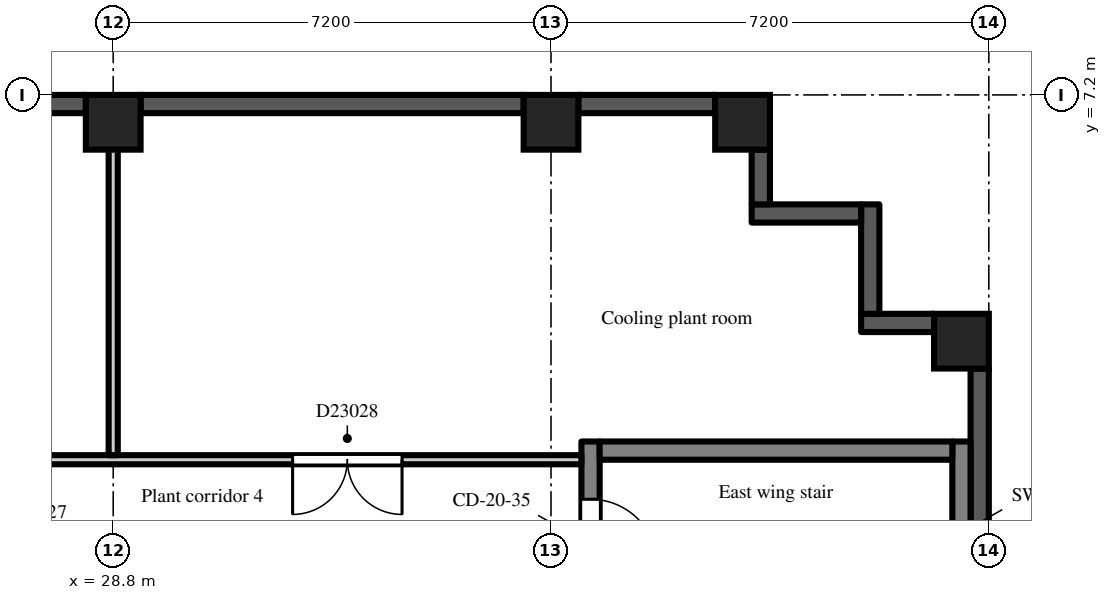
"""IFC4 building model, lengths in metres.
Left out: names, types, materials, properties, quantities, classifications, styles, units other than length and angle.
Written with IfcOpenShell. Run it as: python <this file> out.ifc"""

import sys

from ifc_helpers import new_model, si_unit, direction, frame, frame_2d, origin, origin_2d, place, context, subcontext, project, spatial, polyline, rectangle, outline, extrude, element, fill, save


model = new_model("IFC4")
c1 = context("Model", 3, precision=1e-05, world=origin(), true_north=direction((0.0, 1.0)))
c2 = subcontext(c1, "Body", "Model", "MODEL_VIEW")
j1 = project(units=[si_unit("LENGTHUNIT", "METRE"), si_unit("PLANEANGLEUNIT", "RADIAN")], contexts=[c1])
p1 = place(None, origin())
s1 = spatial("IfcSite", under=j1, at=p1, CompositionType="ELEMENT")
p2 = place(p1, origin())
s2 = spatial("IfcBuilding", under=s1, at=p2, CompositionType="ELEMENT")
p3 = place(p2, frame((0.0, 0.0, 162.3)))
s3 = spatial("IfcBuildingStorey", under=s2, at=p3, CompositionType="ELEMENT", Elevation=162.3)
for number, where, z_axis, x_axis in (
    (1, (28.8, 6.75, 0.0), (0.0, 0.0, 1.0), (1.0, 0.0, 0.0)),
    (2, (36.0, 6.75, 0.0), (0.0, 0.0, 1.0), (1.0, 0.0, 0.0)),
    (3, (39.15, 6.75, 0.0), (0.0, 0.0, 1.0), (1.0, 0.0, 0.0)),
    (4, (42.75, 3.15, 0.0), (0.0, 0.0, 1.0), (1.0, 0.0, 0.0)),
):
    element("IfcColumn", number, at=place(p3, frame(where, z_axis=z_axis, x_axis=x_axis)), inside=s3, PredefinedType="COLUMN", context=c2, shape_type="SweptSolid", body=[
        extrude(rectangle(XDim=0.9, YDim=0.9, at=origin_2d()), origin(), (0.0, 0.0, 1.0), 4.2),
    ])
p4 = place(p3, frame((43.05, -2.7, 0.0), z_axis=(0.0, 0.0, 1.0), x_axis=(0.0, 1.0, 0.0)))
e5 = element("IfcWall", 5, at=p4, inside=s3, PredefinedType="SOLIDWALL", context=c2, shape_type="SweptSolid", body=[
    extrude(rectangle(XDim=5.4, YDim=0.3, at=frame_2d((2.7, 0.0))), origin(), (0.0, 0.0, 1.0), 3.8),
])
p5 = place(p3, frame((42.3, 3.45, 0.0), z_axis=(0.0, 0.0, 1.0), x_axis=(-1.0, 0.0, 0.0)))
e6 = element("IfcWall", 6, at=p5, inside=s3, PredefinedType="SOLIDWALL", context=c2, shape_type="SweptSolid", body=[
    extrude(rectangle(XDim=1.2, YDim=0.3, at=frame_2d((0.6, 0.0))), origin(), (0.0, 0.0, 1.0), 3.8),
])
p6 = place(p3, frame((41.25, 3.6, 0.0), z_axis=(0.0, 0.0, 1.0), x_axis=(0.0, 1.0, 0.0)))
e7 = element("IfcWall", 7, at=p6, inside=s3, PredefinedType="SOLIDWALL", context=c2, shape_type="SweptSolid", body=[
    extrude(rectangle(XDim=1.8, YDim=0.3, at=frame_2d((0.9, 0.0))), origin(), (0.0, 0.0, 1.0), 3.8),
])
p7 = place(p3, frame((41.1, 5.25, 0.0), z_axis=(0.0, 0.0, 1.0), x_axis=(-1.0, 0.0, 0.0)))
e8 = element("IfcWall", 8, at=p7, inside=s3, PredefinedType="SOLIDWALL", context=c2, shape_type="SweptSolid", body=[
    extrude(rectangle(XDim=1.8, YDim=0.3, at=frame_2d((0.9, 0.0))), origin(), (0.0, 0.0, 1.0), 3.8),
])
p8 = place(p3, frame((39.45, 5.4, 0.0), z_axis=(0.0, 0.0, 1.0), x_axis=(0.0, 1.0, 0.0)))
e9 = element("IfcWall", 9, at=p8, inside=s3, PredefinedType="SOLIDWALL", context=c2, shape_type="SweptSolid", body=[
    extrude(rectangle(XDim=0.9, YDim=0.3, at=frame_2d((0.45, 0.0))), origin(), (0.0, 0.0, 1.0), 3.8),
])
p9 = place(p3, frame((38.7, 7.05, 0.0), z_axis=(0.0, 0.0, 1.0), x_axis=(-1.0, 0.0, 0.0)))
e10 = element("IfcWall", 10, at=p9, inside=s3, PredefinedType="SOLIDWALL", context=c2, shape_type="SweptSolid", body=[
    extrude(rectangle(XDim=2.25, YDim=0.3, at=frame_2d((1.125, 0.0))), origin(), (0.0, 0.0, 1.0), 3.8),
])
p10 = place(p3, frame((35.55, 7.05, 0.0), z_axis=(0.0, 0.0, 1.0), x_axis=(-1.0, 0.0, 0.0)))
e11 = element("IfcWall", 11, at=p10, inside=s3, PredefinedType="SOLIDWALL", context=c2, shape_type="SweptSolid", body=[
    extrude(outline(polyline([(0.0, 0.0), (6.3, 0.0), (6.3, 3.8), (5.152, 3.8), (5.15, 3.4), (4.35, 3.4), (4.348, 3.8), (0.0, 3.8), (0.0, 0.0)])), frame((0.0, 0.15, 0.0), z_axis=(0.0, -1.0, 0.0), x_axis=(1.0, 0.0, 0.0)), (0.0, 0.0, 1.0), 0.3),
])
p11 = place(p3, frame((28.35, 7.05, 0.0), z_axis=(0.0, 0.0, 1.0), x_axis=(-1.0, 0.0, 0.0)))
e12 = element("IfcWall", 12, at=p11, inside=s3, PredefinedType="SOLIDWALL", context=c2, shape_type="SweptSolid", body=[
    extrude(rectangle(XDim=3.15, YDim=0.3, at=frame_2d((1.575, 0.0))), origin(), (0.0, 0.0, 1.0), 3.8),
])
p12 = place(p3, frame((36.65, -1.5, 0.0), z_axis=(0.0, 0.0, 1.0), x_axis=(0.0, 1.0, 0.0)))
e13 = element("IfcWall", 13, at=p12, inside=s3, PredefinedType="SHEAR", context=c2, shape_type="SweptSolid", body=[
    extrude(rectangle(XDim=3.0, YDim=0.3, at=frame_2d((1.5, 0.0))), origin(), (0.0, 0.0, 1.0), 3.8),
])
p13 = place(p12, frame((0.95, 0.0, 0.0)))
e14 = element("IfcOpeningElement", 14, at=p13, cuts=e13, PredefinedType="OPENING", context=c2, shape_type="SweptSolid", body=[
    extrude(rectangle(XDim=1.1, YDim=2.1, at=frame_2d((0.55, 1.05))), frame((0.0, 0.16, 0.0), z_axis=(0.0, -1.0, 0.0), x_axis=(1.0, 0.0, 0.0)), (0.0, 0.0, 1.0), 0.32),
])
p14 = place(p3, frame((42.75, -1.5, 0.0), z_axis=(0.0, 0.0, 1.0), x_axis=(0.0, 1.0, 0.0)))
e15 = element("IfcWall", 15, at=p14, inside=s3, PredefinedType="SHEAR", context=c2, shape_type="SweptSolid", body=[
    extrude(rectangle(XDim=3.0, YDim=0.3, at=frame_2d((1.5, 0.0))), origin(), (0.0, 0.0, 1.0), 3.8),
])
p15 = place(p3, frame((36.8, 1.35, 0.0), z_axis=(0.0, 0.0, 1.0), x_axis=(1.0, 0.0, 0.0)))
e16 = element("IfcWall", 16, at=p15, inside=s3, PredefinedType="SHEAR", context=c2, shape_type="SweptSolid", body=[
    extrude(rectangle(XDim=5.8, YDim=0.3, at=frame_2d((2.9, 0.0))), origin(), (0.0, 0.0, 1.0), 3.8),
])
p16 = place(p3, frame((21.6, 1.2, 0.0), z_axis=(0.0, 0.0, 1.0), x_axis=(1.0, 0.0, 0.0)))
e17 = element("IfcWall", 17, at=p16, inside=s3, PredefinedType="PARTITIONING", context=c2, shape_type="SweptSolid", body=[
    extrude(outline(polyline([(0.0, 0.0), (14.9, 0.0), (14.9, 3.8), (9.602, 3.8), (9.6, 3.4), (8.8, 3.4), (8.798, 3.8), (0.0, 3.8), (0.0, 0.0)])), frame((0.0, 0.075, 0.0), z_axis=(0.0, -1.0, 0.0), x_axis=(1.0, 0.0, 0.0)), (0.0, 0.0, 1.0), 0.15),
])
p17 = place(p16, frame((0.65, 0.0, 0.0)))
e18 = element("IfcOpeningElement", 18, at=p17, cuts=e17, PredefinedType="OPENING", context=c2, shape_type="SweptSolid", body=[
    extrude(rectangle(XDim=1.2, YDim=2.1, at=frame_2d((0.6, 1.05))), frame((0.0, 0.085, 0.0), z_axis=(0.0, -1.0, 0.0), x_axis=(1.0, 0.0, 0.0)), (0.0, 0.0, 1.0), 0.17),
])
p18 = place(p16, frame((4.8, 0.0, 0.0)))
e19 = element("IfcOpeningElement", 19, at=p18, cuts=e17, PredefinedType="OPENING", context=c2, shape_type="SweptSolid", body=[
    extrude(rectangle(XDim=1.2, YDim=2.1, at=frame_2d((0.6, 1.05))), frame((0.0, 0.085, 0.0), z_axis=(0.0, -1.0, 0.0), x_axis=(1.0, 0.0, 0.0)), (0.0, 0.0, 1.0), 0.17),
])
p19 = place(p16, frame((10.15, 0.0, 0.0)))
e20 = element("IfcOpeningElement", 20, at=p19, cuts=e17, PredefinedType="OPENING", context=c2, shape_type="SweptSolid", body=[
    extrude(rectangle(XDim=1.8, YDim=2.1, at=frame_2d((0.9, 1.05))), frame((0.0, 0.085, 0.0), z_axis=(0.0, -1.0, 0.0), x_axis=(1.0, 0.0, 0.0)), (0.0, 0.0, 1.0), 0.17),
])
p20 = place(p3, frame((28.8, 1.275, 0.0), z_axis=(0.0, 0.0, 1.0), x_axis=(0.0, 1.0, 0.0)))
e21 = element("IfcWall", 21, at=p20, inside=s3, PredefinedType="PARTITIONING", context=c2, shape_type="SweptSolid", body=[
    extrude(rectangle(XDim=5.625, YDim=0.15, at=frame_2d((2.812, 0.0))), origin(), (0.0, 0.0, 1.0), 2.3),
])
p21 = place(p13, frame((1.1, 0.0, 0.0), z_axis=(0.0, 0.0, 1.0), x_axis=(-1.0, 0.0, 0.0)))
e22 = element("IfcDoor", 22, at=p21, inside=s3, OperationType="SINGLE_SWING_RIGHT", PredefinedType="DOOR", context=c2, shape_type="SweptSolid", body=[
    extrude(rectangle(XDim=1.1, YDim=2.1, at=frame_2d((0.55, 1.05))), frame((0.0, 0.025, 0.0), z_axis=(0.0, -1.0, 0.0), x_axis=(1.0, 0.0, 0.0)), (0.0, 0.0, 1.0), 0.05),
])
fill(e14, e22)
p22 = place(p19, frame((1.8, 0.0, 0.0), z_axis=(0.0, 0.0, 1.0), x_axis=(-1.0, 0.0, 0.0)))
e23 = element("IfcDoor", 23, at=p22, inside=s3, OperationType="DOUBLE_DOOR_DOUBLE_SWING", PredefinedType="DOOR", context=c2, shape_type="SweptSolid", body=[
    extrude(rectangle(XDim=1.8, YDim=2.1, at=frame_2d((0.9, 1.05))), frame((0.0, 0.025, 0.0), z_axis=(0.0, -1.0, 0.0), x_axis=(1.0, 0.0, 0.0)), (0.0, 0.0, 1.0), 0.05),
])
fill(e20, e23)
save(model, sys.argv[1])
